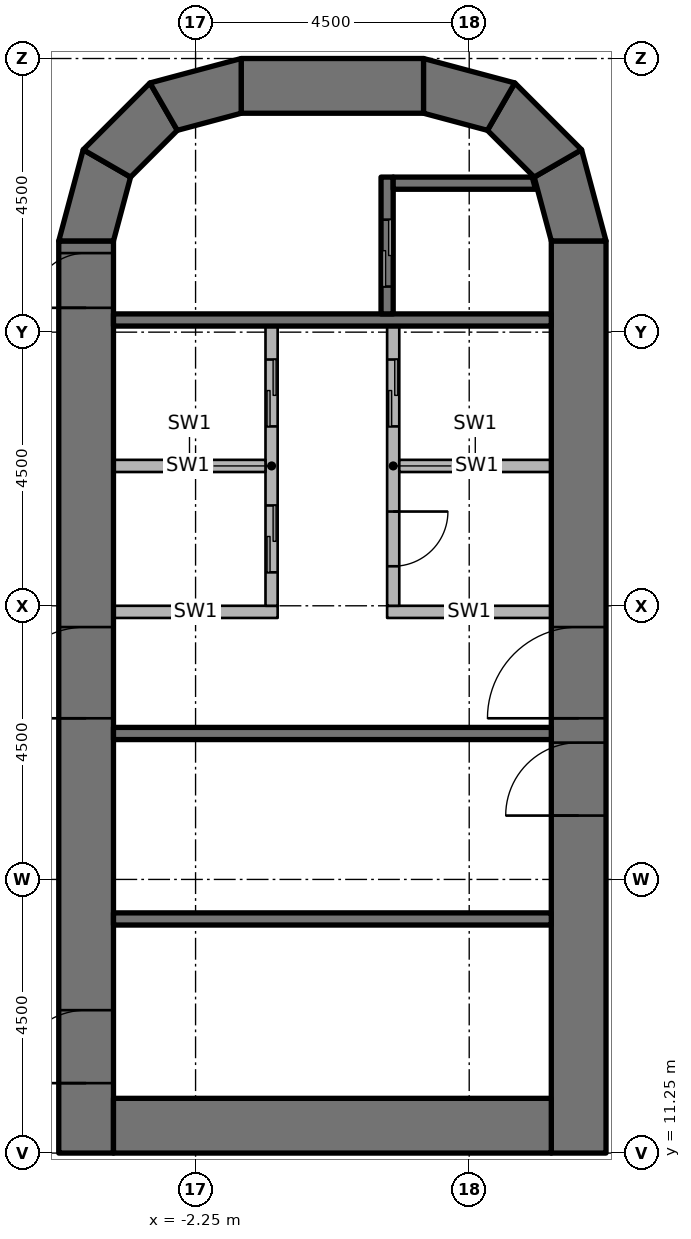
"""IFC4 building model, lengths in metres.
Left out: names, types, materials, properties, quantities, classifications, styles, units other than length and angle.
Written with IfcOpenShell. Run it as: python <this file> out.ifc"""

import sys

from ifc_helpers import new_model, si_unit, direction, frame, frame_2d, origin, place, context, subcontext, project, spatial, polyline, rectangle, outline, extrude, element, fill, save


model = new_model("IFC4")
c1 = context("Model", 3, precision=1e-05, world=origin(), true_north=direction((0.0, 1.0)))
c2 = subcontext(c1, "Body", "Model", "MODEL_VIEW")
j1 = project(units=[si_unit("LENGTHUNIT", "METRE"), si_unit("PLANEANGLEUNIT", "RADIAN")], contexts=[c1])
p1 = place(None, origin())
s1 = spatial("IfcSite", under=j1, at=p1, CompositionType="ELEMENT")
p2 = place(p1, origin())
s2 = spatial("IfcBuilding", under=s1, at=p2, CompositionType="ELEMENT")
p3 = place(p2, frame((0.0, 0.0, 81.6)))
s3 = spatial("IfcBuildingStorey", under=s2, at=p3, CompositionType="ELEMENT", Elevation=81.6)
p4 = place(p3, frame((-4.05, 11.25, 0.0), z_axis=(0.0, 0.0, 1.0), x_axis=(0.0, 1.0, 0.0)))
e1 = element("IfcWall", 1, at=p4, inside=s3, PredefinedType="SHEAR", context=c2, shape_type="SweptSolid", body=[
    extrude(rectangle(XDim=15.0, YDim=0.9, at=frame_2d((7.5, 0.0))), origin(), (0.0, 0.0, 1.0), 5.0),
])
p5 = place(p4, frame((7.15, 0.0, 0.0)))
e2 = element("IfcOpeningElement", 2, at=p5, cuts=e1, PredefinedType="OPENING", context=c2, shape_type="SweptSolid", body=[
    extrude(rectangle(XDim=1.5, YDim=2.3, at=frame_2d((0.75, 1.15))), frame((0.0, 0.46, 0.0), z_axis=(0.0, -1.0, 0.0), x_axis=(1.0, 0.0, 0.0)), (0.0, 0.0, 1.0), 0.92),
])
p6 = place(p4, frame((13.9, 0.0, 0.0)))
e3 = element("IfcOpeningElement", 3, at=p6, cuts=e1, PredefinedType="OPENING", context=c2, shape_type="SweptSolid", body=[
    extrude(rectangle(XDim=0.9, YDim=2.1, at=frame_2d((0.45, 1.05))), frame((0.0, 0.46, 0.0), z_axis=(0.0, -1.0, 0.0), x_axis=(1.0, 0.0, 0.0)), (0.0, 0.0, 1.0), 0.92),
])
p7 = place(p4, frame((1.15, 0.0, 0.0)))
e4 = element("IfcOpeningElement", 4, at=p7, cuts=e1, PredefinedType="OPENING", context=c2, shape_type="SweptSolid", body=[
    extrude(rectangle(XDim=1.2, YDim=2.1, at=frame_2d((0.6, 1.05))), frame((0.0, 0.46, 0.0), z_axis=(0.0, -1.0, 0.0), x_axis=(1.0, 0.0, 0.0)), (0.0, 0.0, 1.0), 0.92),
])
p8 = place(p3, frame((4.05, 11.25, 0.0), z_axis=(0.0, 0.0, 1.0), x_axis=(0.0, 1.0, 0.0)))
e5 = element("IfcWall", 5, at=p8, inside=s3, PredefinedType="SHEAR", context=c2, shape_type="SweptSolid", body=[
    extrude(rectangle(XDim=15.0, YDim=0.9, at=frame_2d((7.5, 0.0))), origin(), (0.0, 0.0, 1.0), 5.0),
])
p9 = place(p8, frame((7.15, 0.0, 0.0)))
e6 = element("IfcOpeningElement", 6, at=p9, cuts=e5, PredefinedType="OPENING", context=c2, shape_type="SweptSolid", body=[
    extrude(rectangle(XDim=1.5, YDim=2.3, at=frame_2d((0.75, 1.15))), frame((0.0, 0.46, 0.0), z_axis=(0.0, -1.0, 0.0), x_axis=(1.0, 0.0, 0.0)), (0.0, 0.0, 1.0), 0.92),
])
p10 = place(p8, frame((5.55, 0.0, 0.0)))
e7 = element("IfcOpeningElement", 7, at=p10, cuts=e5, PredefinedType="OPENING", context=c2, shape_type="SweptSolid", body=[
    extrude(rectangle(XDim=1.2, YDim=2.1, at=frame_2d((0.6, 1.05))), frame((0.0, 0.46, 0.0), z_axis=(0.0, -1.0, 0.0), x_axis=(1.0, 0.0, 0.0)), (0.0, 0.0, 1.0), 0.92),
])
p11 = place(p3, frame((-3.6, 11.7, 0.0), z_axis=(0.0, 0.0, 1.0), x_axis=(1.0, 0.0, 0.0)))
e8 = element("IfcWall", 8, at=p11, inside=s3, PredefinedType="SHEAR", context=c2, shape_type="SweptSolid", body=[
    extrude(rectangle(XDim=7.2, YDim=0.9, at=frame_2d((3.6, 0.0))), origin(), (0.0, 0.0, 1.0), 5.0),
])
p12 = place(p3, frame((-1.5, 28.8, 0.0), z_axis=(0.0, 0.0, 1.0), x_axis=(1.0, 0.0, 0.0)))
e9 = element("IfcWall", 9, at=p12, inside=s3, PredefinedType="SHEAR", context=c2, shape_type="SweptSolid", body=[
    extrude(rectangle(XDim=3.0, YDim=0.9, at=frame_2d((1.5, 0.0))), origin(), (0.0, 0.0, 1.0), 5.0),
])
p13 = place(p3, origin())
e10 = element("IfcWall", 10, at=p13, inside=s3, PredefinedType="SHEAR", context=c2, shape_type="SweptSolid", body=[
    extrude(outline(polyline([(-4.5, 26.25), (-4.098, 27.75), (-3.319, 27.3), (-3.6, 26.25), (-4.5, 26.25)])), origin(), (0.0, 0.0, 1.0), 5.0),
])
p14 = place(p3, origin())
e11 = element("IfcWall", 11, at=p14, inside=s3, PredefinedType="SHEAR", context=c2, shape_type="SweptSolid", body=[
    extrude(outline(polyline([(-4.098, 27.75), (-3.0, 28.848), (-2.55, 28.069), (-3.319, 27.3), (-4.098, 27.75)])), origin(), (0.0, 0.0, 1.0), 5.0),
])
p15 = place(p3, origin())
e12 = element("IfcWall", 12, at=p15, inside=s3, PredefinedType="SHEAR", context=c2, shape_type="SweptSolid", body=[
    extrude(outline(polyline([(-3.0, 28.848), (-1.5, 29.25), (-1.5, 28.35), (-2.55, 28.069), (-3.0, 28.848)])), origin(), (0.0, 0.0, 1.0), 5.0),
])
p16 = place(p3, origin())
e13 = element("IfcWall", 13, at=p16, inside=s3, PredefinedType="SHEAR", context=c2, shape_type="SweptSolid", body=[
    extrude(outline(polyline([(4.5, 26.25), (4.098, 27.75), (3.319, 27.3), (3.6, 26.25), (4.5, 26.25)])), origin(), (0.0, 0.0, 1.0), 5.0),
])
p17 = place(p3, origin())
e14 = element("IfcWall", 14, at=p17, inside=s3, PredefinedType="SHEAR", context=c2, shape_type="SweptSolid", body=[
    extrude(outline(polyline([(4.098, 27.75), (3.0, 28.848), (2.55, 28.069), (3.319, 27.3), (4.098, 27.75)])), origin(), (0.0, 0.0, 1.0), 5.0),
])
p18 = place(p3, origin())
e15 = element("IfcWall", 15, at=p18, inside=s3, PredefinedType="SHEAR", context=c2, shape_type="SweptSolid", body=[
    extrude(outline(polyline([(3.0, 28.848), (1.5, 29.25), (1.5, 28.35), (2.55, 28.069), (3.0, 28.848)])), origin(), (0.0, 0.0, 1.0), 5.0),
])
p19 = place(p3, frame((-3.6, 24.95, 0.0), z_axis=(0.0, 0.0, 1.0), x_axis=(1.0, 0.0, 0.0)))
e16 = element("IfcWall", 16, at=p19, inside=s3, PredefinedType="SHEAR", context=c2, shape_type="SweptSolid", body=[
    extrude(rectangle(XDim=7.2, YDim=0.2, at=frame_2d((3.6, 0.0))), origin(), (0.0, 0.0, 1.0), 4.85),
])
p20 = place(p3, frame((0.9, 27.3, 0.0), z_axis=(0.0, 0.0, 1.0), x_axis=(0.0, -1.0, 0.0)))
e17 = element("IfcWall", 17, at=p20, inside=s3, PredefinedType="SHEAR", context=c2, shape_type="SweptSolid", body=[
    extrude(rectangle(XDim=2.25, YDim=0.2, at=frame_2d((1.125, 0.0))), origin(), (0.0, 0.0, 1.0), 4.85),
])
p21 = place(p20, frame((0.7, 0.0, 0.0)))
e18 = element("IfcOpeningElement", 18, at=p21, cuts=e17, PredefinedType="OPENING", context=c2, shape_type="SweptSolid", body=[
    extrude(rectangle(XDim=1.1, YDim=2.3, at=frame_2d((0.55, 1.15))), frame((0.0, 0.11, 0.0), z_axis=(0.0, -1.0, 0.0), x_axis=(1.0, 0.0, 0.0)), (0.0, 0.0, 1.0), 0.22),
])
p22 = place(p3, origin())
e19 = element("IfcWall", 19, at=p22, inside=s3, PredefinedType="SHEAR", context=c2, shape_type="SweptSolid", body=[
    extrude(outline(polyline([(1.0, 27.1), (3.341, 27.1), (3.291, 27.284), (3.275, 27.3), (1.0, 27.3), (1.0, 27.1)])), origin(), (0.0, 0.0, 1.0), 4.85),
])
for number, where, z_axis, x_axis in (
    (20, (-3.6, 18.15, 0.0), (0.0, 0.0, 1.0), (1.0, 0.0, 0.0)),
    (21, (-3.6, 15.1, 0.0), (0.0, 0.0, 1.0), (1.0, 0.0, 0.0)),
):
    element("IfcWall", number, at=place(p3, frame(where, z_axis=z_axis, x_axis=x_axis)), inside=s3, PredefinedType="SHEAR", context=c2, shape_type="SweptSolid", body=[
        extrude(rectangle(XDim=7.2, YDim=0.2, at=frame_2d((3.6, 0.0))), origin(), (0.0, 0.0, 1.0), 4.85),
    ])
p23 = place(p3, frame((-3.6, 20.15, 0.0), z_axis=(0.0, 0.0, 1.0), x_axis=(1.0, 0.0, 0.0)))
e22 = element("IfcWall", 22, at=p23, inside=s3, PredefinedType="PARTITIONING", context=c2, shape_type="SweptSolid", body=[
    extrude(rectangle(XDim=2.7, YDim=0.2, at=frame_2d((1.35, 0.0))), origin(), (0.0, 0.0, 1.0), 4.85),
])
p24 = place(p3, frame((-1.0, 24.85, 0.0), z_axis=(0.0, 0.0, 1.0), x_axis=(0.0, -1.0, 0.0)))
e23 = element("IfcWall", 23, at=p24, inside=s3, PredefinedType="PARTITIONING", context=c2, shape_type="SweptSolid", body=[
    extrude(rectangle(XDim=4.6, YDim=0.2, at=frame_2d((2.3, 0.0))), origin(), (0.0, 0.0, 1.0), 4.85),
])
p25 = place(p24, frame((0.55, 0.0, 0.0)))
e24 = element("IfcOpeningElement", 24, at=p25, cuts=e23, PredefinedType="OPENING", context=c2, shape_type="SweptSolid", body=[
    extrude(rectangle(XDim=1.1, YDim=2.3, at=frame_2d((0.55, 1.15))), frame((0.0, 0.11, 0.0), z_axis=(0.0, -1.0, 0.0), x_axis=(1.0, 0.0, 0.0)), (0.0, 0.0, 1.0), 0.22),
])
p26 = place(p24, frame((2.95, 0.0, 0.0)))
e25 = element("IfcOpeningElement", 25, at=p26, cuts=e23, PredefinedType="OPENING", context=c2, shape_type="SweptSolid", body=[
    extrude(rectangle(XDim=1.1, YDim=2.3, at=frame_2d((0.55, 1.15))), frame((0.0, 0.11, 0.0), z_axis=(0.0, -1.0, 0.0), x_axis=(1.0, 0.0, 0.0)), (0.0, 0.0, 1.0), 0.22),
])
p27 = place(p3, frame((0.9, 20.15, 0.0), z_axis=(0.0, 0.0, 1.0), x_axis=(1.0, 0.0, 0.0)))
e26 = element("IfcWall", 26, at=p27, inside=s3, PredefinedType="PARTITIONING", context=c2, shape_type="SweptSolid", body=[
    extrude(rectangle(XDim=2.7, YDim=0.2, at=frame_2d((1.35, 0.0))), origin(), (0.0, 0.0, 1.0), 4.85),
])
p28 = place(p3, frame((1.0, 24.85, 0.0), z_axis=(0.0, 0.0, 1.0), x_axis=(0.0, -1.0, 0.0)))
e27 = element("IfcWall", 27, at=p28, inside=s3, PredefinedType="PARTITIONING", context=c2, shape_type="SweptSolid", body=[
    extrude(rectangle(XDim=4.6, YDim=0.2, at=frame_2d((2.3, 0.0))), origin(), (0.0, 0.0, 1.0), 4.85),
])
p29 = place(p28, frame((0.55, 0.0, 0.0)))
e28 = element("IfcOpeningElement", 28, at=p29, cuts=e27, PredefinedType="OPENING", context=c2, shape_type="SweptSolid", body=[
    extrude(rectangle(XDim=1.1, YDim=2.3, at=frame_2d((0.55, 1.15))), frame((0.0, 0.11, 0.0), z_axis=(0.0, -1.0, 0.0), x_axis=(1.0, 0.0, 0.0)), (0.0, 0.0, 1.0), 0.22),
])
p30 = place(p28, frame((3.05, 0.0, 0.0)))
e29 = element("IfcOpeningElement", 29, at=p30, cuts=e27, PredefinedType="OPENING", context=c2, shape_type="SweptSolid", body=[
    extrude(rectangle(XDim=0.9, YDim=2.1, at=frame_2d((0.45, 1.05))), frame((0.0, 0.11, 0.0), z_axis=(0.0, -1.0, 0.0), x_axis=(1.0, 0.0, 0.0)), (0.0, 0.0, 1.0), 0.22),
])
for number, where, z_axis, x_axis in (
    (30, (-3.6, 22.55, 0.0), (0.0, 0.0, 1.0), (1.0, 0.0, 0.0)),
    (31, (1.1, 22.55, 0.0), (0.0, 0.0, 1.0), (1.0, 0.0, 0.0)),
):
    element("IfcWall", number, at=place(p3, frame(where, z_axis=z_axis, x_axis=x_axis)), inside=s3, PredefinedType="PARTITIONING", context=c2, shape_type="SweptSolid", body=[
        extrude(rectangle(XDim=2.5, YDim=0.2, at=frame_2d((1.25, 0.0))), origin(), (0.0, 0.0, 1.0), 4.85),
    ])
p31 = place(p5, origin())
e32 = element("IfcDoor", 32, at=p31, inside=s3, OperationType="DOUBLE_DOOR_SINGLE_SWING", PredefinedType="DOOR", context=c2, shape_type="SweptSolid", body=[
    extrude(rectangle(XDim=1.5, YDim=2.3, at=frame_2d((0.75, 1.15))), frame((0.0, 0.025, 0.0), z_axis=(0.0, -1.0, 0.0), x_axis=(1.0, 0.0, 0.0)), (0.0, 0.0, 1.0), 0.05),
])
fill(e2, e32)
p32 = place(p9, origin())
e33 = element("IfcDoor", 33, at=p32, inside=s3, OperationType="DOUBLE_DOOR_SINGLE_SWING", PredefinedType="DOOR", context=c2, shape_type="SweptSolid", body=[
    extrude(rectangle(XDim=1.5, YDim=2.3, at=frame_2d((0.75, 1.15))), frame((0.0, 0.025, 0.0), z_axis=(0.0, -1.0, 0.0), x_axis=(1.0, 0.0, 0.0)), (0.0, 0.0, 1.0), 0.05),
])
fill(e6, e33)
p33 = place(p6, origin())
e34 = element("IfcDoor", 34, at=p33, inside=s3, OperationType="SINGLE_SWING_LEFT", PredefinedType="DOOR", context=c2, shape_type="SweptSolid", body=[
    extrude(rectangle(XDim=0.9, YDim=2.1, at=frame_2d((0.45, 1.05))), frame((0.0, 0.025, 0.0), z_axis=(0.0, -1.0, 0.0), x_axis=(1.0, 0.0, 0.0)), (0.0, 0.0, 1.0), 0.05),
])
fill(e3, e34)
p34 = place(p10, origin())
e35 = element("IfcDoor", 35, at=p34, inside=s3, OperationType="SINGLE_SWING_LEFT", PredefinedType="DOOR", context=c2, shape_type="SweptSolid", body=[
    extrude(rectangle(XDim=1.2, YDim=2.1, at=frame_2d((0.6, 1.05))), frame((0.0, 0.025, 0.0), z_axis=(0.0, -1.0, 0.0), x_axis=(1.0, 0.0, 0.0)), (0.0, 0.0, 1.0), 0.05),
])
fill(e7, e35)
p35 = place(p7, origin())
e36 = element("IfcDoor", 36, at=p35, inside=s3, OperationType="SINGLE_SWING_RIGHT", PredefinedType="DOOR", context=c2, shape_type="SweptSolid", body=[
    extrude(rectangle(XDim=1.2, YDim=2.1, at=frame_2d((0.6, 1.05))), frame((0.0, 0.025, 0.0), z_axis=(0.0, -1.0, 0.0), x_axis=(1.0, 0.0, 0.0)), (0.0, 0.0, 1.0), 0.05),
])
fill(e4, e36)
p36 = place(p21, origin())
e37 = element("IfcDoor", 37, at=p36, inside=s3, OperationType="DOUBLE_DOOR_SLIDING", PredefinedType="DOOR", context=c2, shape_type="SweptSolid", body=[
    extrude(rectangle(XDim=1.1, YDim=2.3, at=frame_2d((0.55, 1.15))), frame((0.0, 0.025, 0.0), z_axis=(0.0, -1.0, 0.0), x_axis=(1.0, 0.0, 0.0)), (0.0, 0.0, 1.0), 0.05),
])
fill(e18, e37)
p37 = place(p25, origin())
e38 = element("IfcDoor", 38, at=p37, inside=s3, OperationType="DOUBLE_DOOR_SLIDING", PredefinedType="DOOR", context=c2, shape_type="SweptSolid", body=[
    extrude(rectangle(XDim=1.1, YDim=2.3, at=frame_2d((0.55, 1.15))), frame((0.0, 0.025, 0.0), z_axis=(0.0, -1.0, 0.0), x_axis=(1.0, 0.0, 0.0)), (0.0, 0.0, 1.0), 0.05),
])
fill(e24, e38)
p38 = place(p26, origin())
e39 = element("IfcDoor", 39, at=p38, inside=s3, OperationType="DOUBLE_DOOR_SLIDING", PredefinedType="DOOR", context=c2, shape_type="SweptSolid", body=[
    extrude(rectangle(XDim=1.1, YDim=2.3, at=frame_2d((0.55, 1.15))), frame((0.0, 0.025, 0.0), z_axis=(0.0, -1.0, 0.0), x_axis=(1.0, 0.0, 0.0)), (0.0, 0.0, 1.0), 0.05),
])
fill(e25, e39)
p39 = place(p29, origin())
e40 = element("IfcDoor", 40, at=p39, inside=s3, OperationType="DOUBLE_DOOR_SLIDING", PredefinedType="DOOR", context=c2, shape_type="SweptSolid", body=[
    extrude(rectangle(XDim=1.1, YDim=2.3, at=frame_2d((0.55, 1.15))), frame((0.0, 0.025, 0.0), z_axis=(0.0, -1.0, 0.0), x_axis=(1.0, 0.0, 0.0)), (0.0, 0.0, 1.0), 0.05),
])
fill(e28, e40)
p40 = place(p30, origin())
e41 = element("IfcDoor", 41, at=p40, inside=s3, OperationType="SINGLE_SWING_RIGHT", PredefinedType="DOOR", context=c2, shape_type="SweptSolid", body=[
    extrude(rectangle(XDim=0.9, YDim=2.1, at=frame_2d((0.45, 1.05))), frame((0.0, 0.025, 0.0), z_axis=(0.0, -1.0, 0.0), x_axis=(1.0, 0.0, 0.0)), (0.0, 0.0, 1.0), 0.05),
])
fill(e29, e41)
save(model, sys.argv[1])
